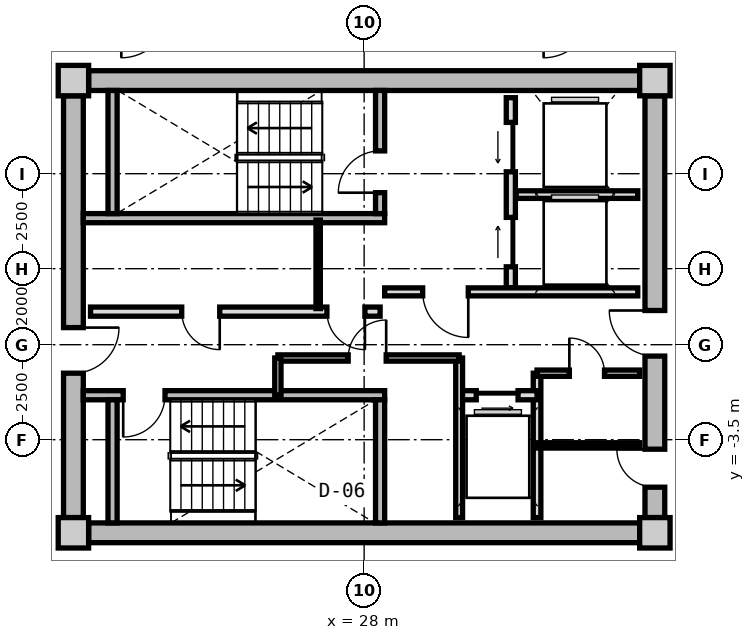
"""IFC4 building model, lengths in metres.
Left out: names, types, materials, properties, quantities, classifications, styles, units other than length and angle.
Written with IfcOpenShell. Run it as: python <this file> out.ifc"""

import sys

from ifc_helpers import new_model, si_unit, direction, frame, frame_2d, origin, origin_2d, place, context, subcontext, project, spatial, rectangle, extrude, source, transform, mapped, element, fill, save


model = new_model("IFC4")
c1 = context("Model", 3, precision=1e-05, world=origin(), true_north=direction((0.0, 1.0)))
c2 = subcontext(c1, "Body", "Model", "MODEL_VIEW")
j1 = project(units=[si_unit("LENGTHUNIT", "METRE"), si_unit("PLANEANGLEUNIT", "RADIAN")], contexts=[c1])
p1 = place(None, origin())
s1 = spatial("IfcSite", under=j1, at=p1, CompositionType="ELEMENT")
p2 = place(p1, origin())
s2 = spatial("IfcBuilding", under=s1, at=p2, CompositionType="ELEMENT")
p3 = place(p2, frame((0.0, 0.0, 229.15)))
s3 = spatial("IfcBuildingStorey", under=s2, at=p3, CompositionType="ELEMENT", Elevation=229.15)
m1 = source(origin(), c2, "Body", "SweptSolid", [
    extrude(rectangle(XDim=0.8, YDim=0.8, at=origin_2d()), origin(), (0.0, 0.0, 1.0), 3.05),
])
for number, where, z_axis, x_axis in (
    (1, (20.35, -5.95, 0.0), (0.0, 0.0, 1.0), (1.0, 0.0, 0.0)),
    (2, (35.65, -5.95, 0.0), (0.0, 0.0, 1.0), (1.0, 0.0, 0.0)),
    (3, (35.65, 5.95, 0.0), (0.0, 0.0, 1.0), (1.0, 0.0, 0.0)),
    (4, (20.35, 5.95, 0.0), (0.0, 0.0, 1.0), (1.0, 0.0, 0.0)),
):
    element("IfcColumn", number, at=place(p3, frame(where, z_axis=z_axis, x_axis=x_axis)), inside=s3, PredefinedType="COLUMN", context=c2, shape_type="MappedRepresentation", body=[
        mapped(m1, transform((0.0, 0.0, 0.0), x_axis=(1.0, 0.0, 0.0), y_axis=(0.0, 1.0, 0.0), z_axis=(0.0, 0.0, 1.0), scale=1.0)),
    ])
m2 = source(origin(), c2, "Body", "SweptSolid", [
    extrude(rectangle(XDim=14.5, YDim=0.52, at=frame_2d((7.25, 0.0))), origin(), (0.0, 0.0, 1.0), 2.81),
])
for number, where, z_axis, x_axis in (
    (5, (20.75, 5.95, 0.0), (0.0, 0.0, 1.0), (1.0, 0.0, 0.0)),
    (6, (35.25, -5.95, 0.0), (0.0, 0.0, 1.0), (-1.0, 0.0, 0.0)),
):
    element("IfcWall", number, at=place(p3, frame(where, z_axis=z_axis, x_axis=x_axis)), inside=s3, PredefinedType="SHEAR", context=c2, shape_type="MappedRepresentation", body=[
        mapped(m2, transform((0.0, 0.0, 0.0), x_axis=(1.0, 0.0, 0.0), y_axis=(0.0, 1.0, 0.0), z_axis=(0.0, 0.0, 1.0), scale=1.0)),
    ])
m3 = source(origin(), c2, "Body", "SweptSolid", [
    extrude(rectangle(XDim=11.1, YDim=0.52, at=frame_2d((5.55, 0.0))), origin(), (0.0, 0.0, 1.0), 2.81),
])
p4 = place(p3, frame((20.35, -5.55, 0.0), z_axis=(0.0, 0.0, 1.0), x_axis=(0.0, 1.0, 0.0)))
e7 = element("IfcWall", 7, at=p4, inside=s3, PredefinedType="SHEAR", context=c2, shape_type="MappedRepresentation", body=[
    mapped(m3, transform((0.0, 0.0, 0.0), x_axis=(1.0, 0.0, 0.0), y_axis=(0.0, 1.0, 0.0), z_axis=(0.0, 0.0, 1.0), scale=1.0)),
])
p5 = place(p4, frame((3.8, 0.0, 0.0)))
e8 = element("IfcOpeningElement", 8, at=p5, cuts=e7, PredefinedType="OPENING", context=c2, shape_type="SweptSolid", body=[
    extrude(rectangle(XDim=1.2, YDim=2.15, at=frame_2d((0.6, 1.075))), frame((0.0, 0.27, 0.0), z_axis=(0.0, -1.0, 0.0), x_axis=(1.0, 0.0, 0.0)), (0.0, 0.0, 1.0), 0.54),
])
p6 = place(p3, frame((35.65, 5.55, 0.0), z_axis=(0.0, 0.0, 1.0), x_axis=(0.0, -1.0, 0.0)))
e9 = element("IfcWall", 9, at=p6, inside=s3, PredefinedType="SHEAR", context=c2, shape_type="MappedRepresentation", body=[
    mapped(m3, transform((0.0, 0.0, 0.0), x_axis=(1.0, 0.0, 0.0), y_axis=(0.0, 1.0, 0.0), z_axis=(0.0, 0.0, 1.0), scale=1.0)),
])
p7 = place(p6, frame((5.65, 0.0, 0.0)))
e10 = element("IfcOpeningElement", 10, at=p7, cuts=e9, PredefinedType="OPENING", context=c2, shape_type="SweptSolid", body=[
    extrude(rectangle(XDim=1.2, YDim=2.15, at=frame_2d((0.6, 1.075))), frame((0.0, 0.27, 0.0), z_axis=(0.0, -1.0, 0.0), x_axis=(1.0, 0.0, 0.0)), (0.0, 0.0, 1.0), 0.54),
])
p8 = place(p6, frame((9.3, 0.0, 0.0)))
e11 = element("IfcOpeningElement", 11, at=p8, cuts=e9, PredefinedType="OPENING", context=c2, shape_type="SweptSolid", body=[
    extrude(rectangle(XDim=1.0, YDim=2.1, at=frame_2d((0.5, 1.05))), frame((0.0, 0.27, 0.0), z_axis=(0.0, -1.0, 0.0), x_axis=(1.0, 0.0, 0.0)), (0.0, 0.0, 1.0), 0.54),
])
m4 = source(origin(), c2, "Body", "SweptSolid", [
    extrude(rectangle(XDim=7.93, YDim=0.24, at=frame_2d((3.965, 0.0))), origin(), (0.0, 0.0, 1.0), 2.81),
])
p9 = place(p3, frame((20.61, 2.33, 0.0), z_axis=(0.0, 0.0, 1.0), x_axis=(1.0, 0.0, 0.0)))
e12 = element("IfcWall", 12, at=p9, inside=s3, PredefinedType="PARTITIONING", context=c2, shape_type="MappedRepresentation", body=[
    mapped(m4, transform((0.0, 0.0, 0.0), x_axis=(1.0, 0.0, 0.0), y_axis=(0.0, 1.0, 0.0), z_axis=(0.0, 0.0, 1.0), scale=1.0)),
])
m5 = source(origin(), c2, "Body", "SweptSolid", [
    extrude(rectangle(XDim=3.24, YDim=0.24, at=frame_2d((1.62, 0.0))), origin(), (0.0, 0.0, 1.0), 2.81),
])
p10 = place(p3, frame((21.38, 2.45, 0.0), z_axis=(0.0, 0.0, 1.0), x_axis=(0.0, 1.0, 0.0)))
e13 = element("IfcWall", 13, at=p10, inside=s3, PredefinedType="PARTITIONING", context=c2, shape_type="MappedRepresentation", body=[
    mapped(m5, transform((0.0, 0.0, 0.0), x_axis=(1.0, 0.0, 0.0), y_axis=(0.0, 1.0, 0.0), z_axis=(0.0, 0.0, 1.0), scale=1.0)),
])
p11 = place(p3, frame((28.42, 2.45, 0.0), z_axis=(0.0, 0.0, 1.0), x_axis=(0.0, 1.0, 0.0)))
e14 = element("IfcWall", 14, at=p11, inside=s3, PredefinedType="PARTITIONING", context=c2, shape_type="MappedRepresentation", body=[
    mapped(m5, transform((0.0, 0.0, 0.0), x_axis=(1.0, 0.0, 0.0), y_axis=(0.0, 1.0, 0.0), z_axis=(0.0, 0.0, 1.0), scale=1.0)),
])
p12 = place(p11, frame((0.55, 0.0, 0.0)))
e15 = element("IfcOpeningElement", 15, at=p12, cuts=e14, PredefinedType="OPENING", context=c2, shape_type="SweptSolid", body=[
    extrude(rectangle(XDim=1.1, YDim=2.15, at=frame_2d((0.55, 1.075))), frame((0.0, 0.13, 0.0), z_axis=(0.0, -1.0, 0.0), x_axis=(1.0, 0.0, 0.0)), (0.0, 0.0, 1.0), 0.26),
])
p13 = place(p3, frame((20.61, -2.33, 0.0), z_axis=(0.0, 0.0, 1.0), x_axis=(1.0, 0.0, 0.0)))
e16 = element("IfcWall", 16, at=p13, inside=s3, PredefinedType="PARTITIONING", context=c2, shape_type="MappedRepresentation", body=[
    mapped(m4, transform((0.0, 0.0, 0.0), x_axis=(1.0, 0.0, 0.0), y_axis=(0.0, 1.0, 0.0), z_axis=(0.0, 0.0, 1.0), scale=1.0)),
])
p14 = place(p13, frame((1.05, 0.0, 0.0)))
e17 = element("IfcOpeningElement", 17, at=p14, cuts=e16, PredefinedType="OPENING", context=c2, shape_type="SweptSolid", body=[
    extrude(rectangle(XDim=1.1, YDim=2.15, at=frame_2d((0.55, 1.075))), frame((0.0, 0.13, 0.0), z_axis=(0.0, -1.0, 0.0), x_axis=(1.0, 0.0, 0.0)), (0.0, 0.0, 1.0), 0.26),
])
for number, where, z_axis, x_axis in (
    (18, (21.38, -5.69, 0.0), (0.0, 0.0, 1.0), (0.0, 1.0, 0.0)),
    (19, (28.42, -5.69, 0.0), (0.0, 0.0, 1.0), (0.0, 1.0, 0.0)),
):
    element("IfcWall", number, at=place(p3, frame(where, z_axis=z_axis, x_axis=x_axis)), inside=s3, PredefinedType="PARTITIONING", context=c2, shape_type="MappedRepresentation", body=[
        mapped(m5, transform((0.0, 0.0, 0.0), x_axis=(1.0, 0.0, 0.0), y_axis=(0.0, 1.0, 0.0), z_axis=(0.0, 0.0, 1.0), scale=1.0)),
    ])
m6 = source(origin(), c2, "Body", "SweptSolid", [
    extrude(rectangle(XDim=5.0, YDim=0.24, at=frame_2d((2.5, 0.0))), origin(), (0.0, 0.0, 1.0), 2.795),
])
p15 = place(p3, frame((31.86, 0.5, 0.0), z_axis=(0.0, 0.0, 1.0), x_axis=(0.0, 1.0, 0.0)))
e20 = element("IfcWall", 20, at=p15, inside=s3, PredefinedType="PARTITIONING", context=c2, shape_type="MappedRepresentation", body=[
    mapped(m6, transform((0.0, 0.0, 0.0), x_axis=(1.0, 0.0, 0.0), y_axis=(0.0, 1.0, 0.0), z_axis=(0.0, 0.0, 1.0), scale=1.0)),
])
p16 = place(p15, frame((3.05, 0.0, 0.0)))
e21 = element("IfcOpeningElement", 21, at=p16, cuts=e20, PredefinedType="OPENING", context=c2, shape_type="SweptSolid", body=[
    extrude(rectangle(XDim=1.3, YDim=2.2, at=frame_2d((0.65, 1.1))), frame((0.0, 0.13, 0.0), z_axis=(0.0, -1.0, 0.0), x_axis=(1.0, 0.0, 0.0)), (0.0, 0.0, 1.0), 0.26),
])
p17 = place(p15, frame((0.55, 0.0, 0.0)))
e22 = element("IfcOpeningElement", 22, at=p17, cuts=e20, PredefinedType="OPENING", context=c2, shape_type="SweptSolid", body=[
    extrude(rectangle(XDim=1.3, YDim=2.2, at=frame_2d((0.65, 1.1))), frame((0.0, 0.13, 0.0), z_axis=(0.0, -1.0, 0.0), x_axis=(1.0, 0.0, 0.0)), (0.0, 0.0, 1.0), 0.26),
])
m7 = source(origin(), c2, "Body", "SweptSolid", [
    extrude(rectangle(XDim=3.2, YDim=0.2, at=frame_2d((1.6, 0.0))), origin(), (0.0, 0.0, 1.0), 2.795),
])
p18 = place(p3, frame((32.0, 2.95, 0.0), z_axis=(0.0, 0.0, 1.0), x_axis=(1.0, 0.0, 0.0)))
e23 = element("IfcWall", 23, at=p18, inside=s3, PredefinedType="PARTITIONING", context=c2, shape_type="MappedRepresentation", body=[
    mapped(m7, transform((0.0, 0.0, 0.0), x_axis=(1.0, 0.0, 0.0), y_axis=(0.0, 1.0, 0.0), z_axis=(0.0, 0.0, 1.0), scale=1.0)),
])
m8 = source(origin(), c2, "Body", "SweptSolid", [
    extrude(rectangle(XDim=6.66, YDim=0.21, at=frame_2d((3.33, 0.0))), origin(), (0.0, 0.0, 1.0), 2.795),
])
p19 = place(p3, frame((28.54, 0.39, 0.0), z_axis=(0.0, 0.0, 1.0), x_axis=(1.0, 0.0, 0.0)))
e24 = element("IfcWall", 24, at=p19, inside=s3, PredefinedType="PARTITIONING", context=c2, shape_type="MappedRepresentation", body=[
    mapped(m8, transform((0.0, 0.0, 0.0), x_axis=(1.0, 0.0, 0.0), y_axis=(0.0, 1.0, 0.0), z_axis=(0.0, 0.0, 1.0), scale=1.0)),
])
p20 = place(p19, frame((1.0, 0.0, 0.0)))
e25 = element("IfcOpeningElement", 25, at=p20, cuts=e24, PredefinedType="OPENING", context=c2, shape_type="SweptSolid", body=[
    extrude(rectangle(XDim=1.2, YDim=2.15, at=frame_2d((0.6, 1.075))), frame((0.0, 0.115, 0.0), z_axis=(0.0, -1.0, 0.0), x_axis=(1.0, 0.0, 0.0)), (0.0, 0.0, 1.0), 0.23),
])
m9 = source(origin(), c2, "Body", "SweptSolid", [
    extrude(rectangle(XDim=7.62, YDim=0.24, at=frame_2d((3.81, 0.0))), origin(), (0.0, 0.0, 1.0), 2.795),
])
p21 = place(p3, frame((20.8, -0.13, 0.0), z_axis=(0.0, 0.0, 1.0), x_axis=(1.0, 0.0, 0.0)))
e26 = element("IfcWall", 26, at=p21, inside=s3, PredefinedType="PARTITIONING", context=c2, shape_type="MappedRepresentation", body=[
    mapped(m9, transform((0.0, 0.0, 0.0), x_axis=(1.0, 0.0, 0.0), y_axis=(0.0, 1.0, 0.0), z_axis=(0.0, 0.0, 1.0), scale=1.0)),
])
p22 = place(p21, frame((6.22, 0.0, 0.0)))
e27 = element("IfcOpeningElement", 27, at=p22, cuts=e26, PredefinedType="OPENING", context=c2, shape_type="SweptSolid", body=[
    extrude(rectangle(XDim=1.0, YDim=2.1, at=frame_2d((0.5, 1.05))), frame((0.0, 0.13, 0.0), z_axis=(0.0, -1.0, 0.0), x_axis=(1.0, 0.0, 0.0)), (0.0, 0.0, 1.0), 0.26),
])
p23 = place(p21, frame((2.4, 0.0, 0.0)))
e28 = element("IfcOpeningElement", 28, at=p23, cuts=e26, PredefinedType="OPENING", context=c2, shape_type="SweptSolid", body=[
    extrude(rectangle(XDim=1.0, YDim=2.1, at=frame_2d((0.5, 1.05))), frame((0.0, 0.13, 0.0), z_axis=(0.0, -1.0, 0.0), x_axis=(1.0, 0.0, 0.0)), (0.0, 0.0, 1.0), 0.26),
])
m10 = source(origin(), c2, "Body", "SweptSolid", [
    extrude(rectangle(XDim=2.33, YDim=0.115, at=frame_2d((1.165, 0.0))), origin(), (0.0, 0.0, 1.0), 2.795),
])
p24 = place(p3, frame((26.79, -0.05, 0.0), z_axis=(0.0, 0.0, 1.0), x_axis=(0.0, 1.0, 0.0)))
e29 = element("IfcWall", 29, at=p24, inside=s3, PredefinedType="PARTITIONING", context=c2, shape_type="MappedRepresentation", body=[
    mapped(m10, transform((0.0, 0.0, 0.0), x_axis=(1.0, 0.0, 0.0), y_axis=(0.0, 1.0, 0.0), z_axis=(0.0, 0.0, 1.0), scale=1.0)),
])
m11 = source(origin(), c2, "Body", "SweptSolid", [
    extrude(rectangle(XDim=3.8, YDim=0.2, at=frame_2d((1.9, 0.0))), origin(), (0.0, 0.0, 1.0), 2.795),
])
p25 = place(p3, frame((32.55, -5.55, 0.0), z_axis=(0.0, 0.0, 1.0), x_axis=(0.0, 1.0, 0.0)))
e30 = element("IfcWall", 30, at=p25, inside=s3, PredefinedType="PARTITIONING", context=c2, shape_type="MappedRepresentation", body=[
    mapped(m11, transform((0.0, 0.0, 0.0), x_axis=(1.0, 0.0, 0.0), y_axis=(0.0, 1.0, 0.0), z_axis=(0.0, 0.0, 1.0), scale=1.0)),
])
m12 = source(origin(), c2, "Body", "SweptSolid", [
    extrude(rectangle(XDim=2.05, YDim=0.24, at=frame_2d((1.025, 0.0))), origin(), (0.0, 0.0, 1.0), 2.795),
])
p26 = place(p3, frame((30.5, -2.33, 0.0), z_axis=(0.0, 0.0, 1.0), x_axis=(1.0, 0.0, 0.0)))
e31 = element("IfcWall", 31, at=p26, inside=s3, PredefinedType="PARTITIONING", context=c2, shape_type="MappedRepresentation", body=[
    mapped(m12, transform((0.0, 0.0, 0.0), x_axis=(1.0, 0.0, 0.0), y_axis=(0.0, 1.0, 0.0), z_axis=(0.0, 0.0, 1.0), scale=1.0)),
])
p27 = place(p26, frame((0.45, 0.0, 0.0)))
e32 = element("IfcOpeningElement", 32, at=p27, cuts=e31, PredefinedType="OPENING", context=c2, shape_type="SweptSolid", body=[
    extrude(rectangle(XDim=1.1, YDim=2.2, at=frame_2d((0.55, 1.1))), frame((0.0, 0.13, 0.0), z_axis=(0.0, -1.0, 0.0), x_axis=(1.0, 0.0, 0.0)), (0.0, 0.0, 1.0), 0.26),
])
m13 = source(origin(), c2, "Body", "SweptSolid", [
    extrude(rectangle(XDim=4.2, YDim=0.18, at=frame_2d((2.1, 0.0))), origin(), (0.0, 0.0, 1.0), 2.795),
])
p28 = place(p3, frame((30.5, -5.55, 0.0), z_axis=(0.0, 0.0, 1.0), x_axis=(0.0, 1.0, 0.0)))
e33 = element("IfcWall", 33, at=p28, inside=s3, PredefinedType="PARTITIONING", context=c2, shape_type="MappedRepresentation", body=[
    mapped(m13, transform((0.0, 0.0, 0.0), x_axis=(1.0, 0.0, 0.0), y_axis=(0.0, 1.0, 0.0), z_axis=(0.0, 0.0, 1.0), scale=1.0)),
])
m14 = source(origin(), c2, "Body", "SweptSolid", [
    extrude(rectangle(XDim=4.77, YDim=0.165, at=frame_2d((2.385, 0.0))), origin(), (0.0, 0.0, 1.0), 2.795),
])
p29 = place(p3, frame((25.73, -1.35, 0.0), z_axis=(0.0, 0.0, 1.0), x_axis=(1.0, 0.0, 0.0)))
e34 = element("IfcWall", 34, at=p29, inside=s3, PredefinedType="PARTITIONING", context=c2, shape_type="MappedRepresentation", body=[
    mapped(m14, transform((0.0, 0.0, 0.0), x_axis=(1.0, 0.0, 0.0), y_axis=(0.0, 1.0, 0.0), z_axis=(0.0, 0.0, 1.0), scale=1.0)),
])
p30 = place(p29, frame((1.85, 0.0, 0.0)))
e35 = element("IfcOpeningElement", 35, at=p30, cuts=e34, PredefinedType="OPENING", context=c2, shape_type="SweptSolid", body=[
    extrude(rectangle(XDim=1.0, YDim=2.1, at=frame_2d((0.5, 1.05))), frame((0.0, 0.093, 0.0), z_axis=(0.0, -1.0, 0.0), x_axis=(1.0, 0.0, 0.0)), (0.0, 0.0, 1.0), 0.185),
])
m15 = source(origin(), c2, "Body", "SweptSolid", [
    extrude(rectangle(XDim=0.98, YDim=0.165, at=frame_2d((0.49, 0.0))), origin(), (0.0, 0.0, 1.0), 2.795),
])
p31 = place(p3, frame((25.73, -2.33, 0.0), z_axis=(0.0, 0.0, 1.0), x_axis=(0.0, 1.0, 0.0)))
e36 = element("IfcWall", 36, at=p31, inside=s3, PredefinedType="PARTITIONING", context=c2, shape_type="MappedRepresentation", body=[
    mapped(m15, transform((0.0, 0.0, 0.0), x_axis=(1.0, 0.0, 0.0), y_axis=(0.0, 1.0, 0.0), z_axis=(0.0, 0.0, 1.0), scale=1.0)),
])
m16 = source(origin(), c2, "Body", "SweptSolid", [
    extrude(rectangle(XDim=2.7, YDim=0.165, at=frame_2d((1.35, 0.0))), origin(), (0.0, 0.0, 1.0), 2.795),
])
p32 = place(p3, frame((32.55, -1.75, 0.0), z_axis=(0.0, 0.0, 1.0), x_axis=(1.0, 0.0, 0.0)))
e37 = element("IfcWall", 37, at=p32, inside=s3, PredefinedType="PARTITIONING", context=c2, shape_type="MappedRepresentation", body=[
    mapped(m16, transform((0.0, 0.0, 0.0), x_axis=(1.0, 0.0, 0.0), y_axis=(0.0, 1.0, 0.0), z_axis=(0.0, 0.0, 1.0), scale=1.0)),
])
p33 = place(p32, frame((0.85, 0.0, 0.0)))
e38 = element("IfcOpeningElement", 38, at=p33, cuts=e37, PredefinedType="OPENING", context=c2, shape_type="SweptSolid", body=[
    extrude(rectangle(XDim=0.925, YDim=2.1, at=frame_2d((0.462, 1.05))), frame((0.0, 0.093, 0.0), z_axis=(0.0, -1.0, 0.0), x_axis=(1.0, 0.0, 0.0)), (0.0, 0.0, 1.0), 0.185),
])
m17 = source(origin(), c2, "Body", "SweptSolid", [
    extrude(rectangle(XDim=2.7, YDim=0.14, at=frame_2d((1.35, 0.0))), origin(), (0.0, 0.0, 1.0), 2.795),
])
p34 = place(p3, frame((32.55, -3.65, 0.0), z_axis=(0.0, 0.0, 1.0), x_axis=(1.0, 0.0, 0.0)))
e39 = element("IfcWall", 39, at=p34, inside=s3, PredefinedType="PARTITIONING", context=c2, shape_type="MappedRepresentation", body=[
    mapped(m17, transform((0.0, 0.0, 0.0), x_axis=(1.0, 0.0, 0.0), y_axis=(0.0, 1.0, 0.0), z_axis=(0.0, 0.0, 1.0), scale=1.0)),
])
m18 = source(origin(), c2, "Body", "SweptSolid", [
    extrude(rectangle(XDim=1.1, YDim=2.15, at=frame_2d((0.55, 1.075))), frame((0.0, 0.025, 0.0), z_axis=(0.0, -1.0, 0.0), x_axis=(1.0, 0.0, 0.0)), (0.0, 0.0, 1.0), 0.05),
])
p35 = place(p12, origin())
e40 = element("IfcDoor", 40, at=p35, inside=s3, OperationType="SINGLE_SWING_LEFT", PredefinedType="DOOR", context=c2, shape_type="MappedRepresentation", body=[
    mapped(m18, transform((0.0, 0.0, 0.0), x_axis=(1.0, 0.0, 0.0), y_axis=(0.0, 1.0, 0.0), z_axis=(0.0, 0.0, 1.0), scale=1.0)),
])
fill(e15, e40)
p36 = place(p14, frame((1.1, 0.0, 0.0), z_axis=(0.0, 0.0, 1.0), x_axis=(-1.0, 0.0, 0.0)))
e41 = element("IfcDoor", 41, at=p36, inside=s3, OperationType="SINGLE_SWING_RIGHT", PredefinedType="DOOR", context=c2, shape_type="MappedRepresentation", body=[
    mapped(m18, transform((0.0, 0.0, 0.0), x_axis=(1.0, 0.0, 0.0), y_axis=(0.0, 1.0, 0.0), z_axis=(0.0, 0.0, 1.0), scale=1.0)),
])
fill(e17, e41)
m19 = source(origin(), c2, "Body", "SweptSolid", [
    extrude(rectangle(XDim=1.3, YDim=2.2, at=frame_2d((0.65, 1.1))), frame((0.0, 0.025, 0.0), z_axis=(0.0, -1.0, 0.0), x_axis=(1.0, 0.0, 0.0)), (0.0, 0.0, 1.0), 0.05),
])
p37 = place(p16, origin())
e42 = element("IfcDoor", 42, at=p37, inside=s3, OperationType="SLIDING_TO_LEFT", PredefinedType="DOOR", context=c2, shape_type="MappedRepresentation", body=[
    mapped(m19, transform((0.0, 0.0, 0.0), x_axis=(1.0, 0.0, 0.0), y_axis=(0.0, 1.0, 0.0), z_axis=(0.0, 0.0, 1.0), scale=1.0)),
])
fill(e21, e42)
p38 = place(p17, origin())
e43 = element("IfcDoor", 43, at=p38, inside=s3, OperationType="SLIDING_TO_RIGHT", PredefinedType="DOOR", context=c2, shape_type="MappedRepresentation", body=[
    mapped(m19, transform((0.0, 0.0, 0.0), x_axis=(1.0, 0.0, 0.0), y_axis=(0.0, 1.0, 0.0), z_axis=(0.0, 0.0, 1.0), scale=1.0)),
])
fill(e22, e43)
m20 = source(origin(), c2, "Body", "SweptSolid", [
    extrude(rectangle(XDim=1.2, YDim=2.15, at=frame_2d((0.6, 1.075))), frame((0.0, 0.025, 0.0), z_axis=(0.0, -1.0, 0.0), x_axis=(1.0, 0.0, 0.0)), (0.0, 0.0, 1.0), 0.05),
])
p39 = place(p20, frame((1.2, 0.0, 0.0), z_axis=(0.0, 0.0, 1.0), x_axis=(-1.0, 0.0, 0.0)))
e44 = element("IfcDoor", 44, at=p39, inside=s3, OperationType="SINGLE_SWING_LEFT", PredefinedType="DOOR", context=c2, shape_type="MappedRepresentation", body=[
    mapped(m20, transform((0.0, 0.0, 0.0), x_axis=(1.0, 0.0, 0.0), y_axis=(0.0, 1.0, 0.0), z_axis=(0.0, 0.0, 1.0), scale=1.0)),
])
fill(e25, e44)
p40 = place(p5, frame((1.2, 0.0, 0.0), z_axis=(0.0, 0.0, 1.0), x_axis=(-1.0, 0.0, 0.0)))
e45 = element("IfcDoor", 45, at=p40, inside=s3, OperationType="SINGLE_SWING_LEFT", PredefinedType="DOOR", context=c2, shape_type="MappedRepresentation", body=[
    mapped(m20, transform((0.0, 0.0, 0.0), x_axis=(1.0, 0.0, 0.0), y_axis=(0.0, 1.0, 0.0), z_axis=(0.0, 0.0, 1.0), scale=1.0)),
])
fill(e8, e45)
p41 = place(p7, frame((1.2, 0.0, 0.0), z_axis=(0.0, 0.0, 1.0), x_axis=(-1.0, 0.0, 0.0)))
e46 = element("IfcDoor", 46, at=p41, inside=s3, OperationType="SINGLE_SWING_RIGHT", PredefinedType="DOOR", context=c2, shape_type="MappedRepresentation", body=[
    mapped(m20, transform((0.0, 0.0, 0.0), x_axis=(1.0, 0.0, 0.0), y_axis=(0.0, 1.0, 0.0), z_axis=(0.0, 0.0, 1.0), scale=1.0)),
])
fill(e10, e46)
m21 = source(origin(), c2, "Body", "SweptSolid", [
    extrude(rectangle(XDim=1.0, YDim=2.1, at=frame_2d((0.5, 1.05))), frame((0.0, 0.025, 0.0), z_axis=(0.0, -1.0, 0.0), x_axis=(1.0, 0.0, 0.0)), (0.0, 0.0, 1.0), 0.05),
])
p42 = place(p22, frame((1.0, 0.0, 0.0), z_axis=(0.0, 0.0, 1.0), x_axis=(-1.0, 0.0, 0.0)))
e47 = element("IfcDoor", 47, at=p42, inside=s3, OperationType="SINGLE_SWING_LEFT", PredefinedType="DOOR", context=c2, shape_type="MappedRepresentation", body=[
    mapped(m21, transform((0.0, 0.0, 0.0), x_axis=(1.0, 0.0, 0.0), y_axis=(0.0, 1.0, 0.0), z_axis=(0.0, 0.0, 1.0), scale=1.0)),
])
fill(e27, e47)
p43 = place(p23, frame((1.0, 0.0, 0.0), z_axis=(0.0, 0.0, 1.0), x_axis=(-1.0, 0.0, 0.0)))
e48 = element("IfcDoor", 48, at=p43, inside=s3, OperationType="SINGLE_SWING_LEFT", PredefinedType="DOOR", context=c2, shape_type="MappedRepresentation", body=[
    mapped(m21, transform((0.0, 0.0, 0.0), x_axis=(1.0, 0.0, 0.0), y_axis=(0.0, 1.0, 0.0), z_axis=(0.0, 0.0, 1.0), scale=1.0)),
])
fill(e28, e48)
m22 = source(origin(), c2, "Body", "SweptSolid", [
    extrude(rectangle(XDim=1.1, YDim=2.2, at=frame_2d((0.55, 1.1))), frame((0.0, 0.025, 0.0), z_axis=(0.0, -1.0, 0.0), x_axis=(1.0, 0.0, 0.0)), (0.0, 0.0, 1.0), 0.05),
])
p44 = place(p27, frame((1.1, 0.0, 0.0), z_axis=(0.0, 0.0, 1.0), x_axis=(-1.0, 0.0, 0.0)))
e49 = element("IfcDoor", 49, at=p44, inside=s3, OperationType="SLIDING_TO_RIGHT", PredefinedType="DOOR", context=c2, shape_type="MappedRepresentation", body=[
    mapped(m22, transform((0.0, 0.0, 0.0), x_axis=(1.0, 0.0, 0.0), y_axis=(0.0, 1.0, 0.0), z_axis=(0.0, 0.0, 1.0), scale=1.0)),
])
fill(e32, e49)
p45 = place(p30, origin())
e50 = element("IfcDoor", 50, at=p45, inside=s3, OperationType="SINGLE_SWING_RIGHT", PredefinedType="DOOR", context=c2, shape_type="MappedRepresentation", body=[
    mapped(m21, transform((0.0, 0.0, 0.0), x_axis=(1.0, 0.0, 0.0), y_axis=(0.0, 1.0, 0.0), z_axis=(0.0, 0.0, 1.0), scale=1.0)),
])
fill(e35, e50)
m23 = source(origin(), c2, "Body", "SweptSolid", [
    extrude(rectangle(XDim=0.925, YDim=2.1, at=frame_2d((0.462, 1.05))), frame((0.0, 0.025, 0.0), z_axis=(0.0, -1.0, 0.0), x_axis=(1.0, 0.0, 0.0)), (0.0, 0.0, 1.0), 0.05),
])
p46 = place(p33, origin())
e51 = element("IfcDoor", 51, at=p46, inside=s3, OperationType="SINGLE_SWING_LEFT", PredefinedType="DOOR", context=c2, shape_type="MappedRepresentation", body=[
    mapped(m23, transform((0.0, 0.0, 0.0), x_axis=(1.0, 0.0, 0.0), y_axis=(0.0, 1.0, 0.0), z_axis=(0.0, 0.0, 1.0), scale=1.0)),
])
fill(e38, e51)
p47 = place(p8, frame((1.0, 0.0, 0.0), z_axis=(0.0, 0.0, 1.0), x_axis=(-1.0, 0.0, 0.0)))
e52 = element("IfcDoor", 52, at=p47, inside=s3, OperationType="SINGLE_SWING_RIGHT", PredefinedType="DOOR", context=c2, shape_type="MappedRepresentation", body=[
    mapped(m21, transform((0.0, 0.0, 0.0), x_axis=(1.0, 0.0, 0.0), y_axis=(0.0, 1.0, 0.0), z_axis=(0.0, 0.0, 1.0), scale=1.0)),
])
fill(e11, e52)
save(model, sys.argv[1])
